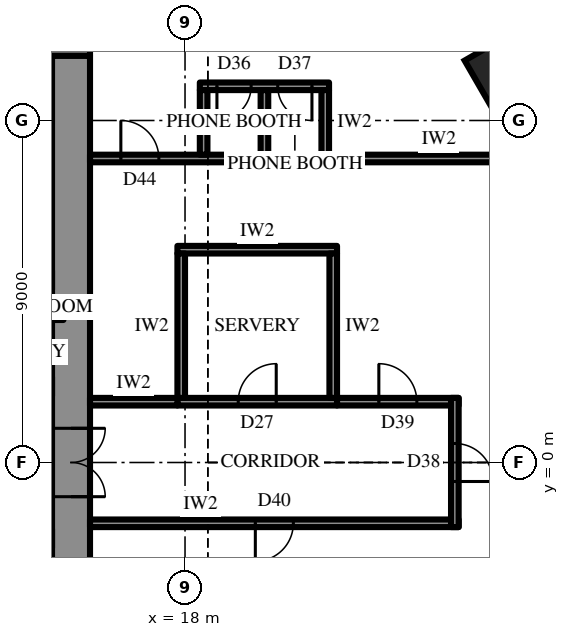
"""IFC4 building model, lengths in metres.
Left out: names, types, materials, properties, quantities, classifications, styles, units other than length and angle.
Written with IfcOpenShell. Run it as: python <this file> out.ifc"""

import sys

from ifc_helpers import new_model, si_unit, direction, frame, frame_2d, origin, origin_2d, place, context, subcontext, project, spatial, rectangle, hollow_rectangle, extrude, element, fill, save


model = new_model("IFC4")
c1 = context("Model", 3, precision=1e-05, world=origin(), true_north=direction((0.0, 1.0)))
c2 = subcontext(c1, "Body", "Model", "MODEL_VIEW")
j1 = project(units=[si_unit("LENGTHUNIT", "METRE"), si_unit("PLANEANGLEUNIT", "RADIAN")], contexts=[c1])
p1 = place(None, origin())
s1 = spatial("IfcSite", under=j1, at=p1, CompositionType="ELEMENT")
p2 = place(p1, origin())
s2 = spatial("IfcBuilding", under=s1, at=p2, CompositionType="ELEMENT")
p3 = place(p2, frame((0.0, 0.0, 215.5)))
s3 = spatial("IfcBuildingStorey", under=s2, at=p3, CompositionType="ELEMENT", Elevation=215.5)
p4 = place(p3, frame((26.861, 10.175, 0.0), z_axis=(0.0, 0.0, 1.0), x_axis=(-0.5, 0.866025403784, 0.0)))
e1 = element("IfcColumn", 1, at=p4, inside=s3, PredefinedType="COLUMN", context=c2, shape_type="SweptSolid", body=[
    extrude(hollow_rectangle(XDim=2.2, YDim=2.2, WallThickness=0.12, at=origin_2d()), origin(), (0.0, 0.0, 1.0), 4.2),
])
p5 = place(p3, frame((-15.5, 11.5, 0.0), z_axis=(0.0, 0.0, 1.0), x_axis=(1.0, 0.0, 0.0)))
e2 = element("IfcWall", 2, at=p5, inside=s3, PredefinedType="SHEAR", context=c2, shape_type="SweptSolid", body=[
    extrude(rectangle(XDim=31.0, YDim=1.6, at=frame_2d((15.5, 0.0))), origin(), (0.0, 0.0, 1.0), 4.2),
])
p6 = place(p5, frame((16.35, 0.0, 0.0)))
e3 = element("IfcOpeningElement", 3, at=p6, cuts=e2, PredefinedType="OPENING", context=c2, shape_type="SweptSolid", body=[
    extrude(rectangle(XDim=0.9, YDim=2.2, at=frame_2d((0.45, 1.1))), frame((0.0, 0.81, 0.0), z_axis=(0.0, -1.0, 0.0), x_axis=(1.0, 0.0, 0.0)), (0.0, 0.0, 1.0), 1.62),
])
p7 = place(p5, frame((19.35, 0.0, 0.0)))
e4 = element("IfcOpeningElement", 4, at=p7, cuts=e2, PredefinedType="OPENING", context=c2, shape_type="SweptSolid", body=[
    extrude(rectangle(XDim=0.9, YDim=2.2, at=frame_2d((0.45, 1.1))), frame((0.0, 0.81, 0.0), z_axis=(0.0, -1.0, 0.0), x_axis=(1.0, 0.0, 0.0)), (0.0, 0.0, 1.0), 1.62),
])
p8 = place(p5, frame((22.4, 0.0, 0.0)))
e5 = element("IfcOpeningElement", 5, at=p8, cuts=e2, PredefinedType="OPENING", context=c2, shape_type="SweptSolid", body=[
    extrude(rectangle(XDim=1.0, YDim=2.2, at=frame_2d((0.5, 1.1))), frame((0.0, 0.81, 0.0), z_axis=(0.0, -1.0, 0.0), x_axis=(1.0, 0.0, 0.0)), (0.0, 0.0, 1.0), 1.62),
])
p9 = place(p5, frame((1.65, 0.0, 0.0)))
e6 = element("IfcOpeningElement", 6, at=p9, cuts=e2, PredefinedType="OPENING", context=c2, shape_type="SweptSolid", body=[
    extrude(rectangle(XDim=0.9, YDim=2.2, at=frame_2d((0.45, 1.1))), frame((0.0, 0.81, 0.0), z_axis=(0.0, -1.0, 0.0), x_axis=(1.0, 0.0, 0.0)), (0.0, 0.0, 1.0), 1.62),
])
p10 = place(p5, frame((4.65, 0.0, 0.0)))
e7 = element("IfcOpeningElement", 7, at=p10, cuts=e2, PredefinedType="OPENING", context=c2, shape_type="SweptSolid", body=[
    extrude(rectangle(XDim=0.9, YDim=2.2, at=frame_2d((0.45, 1.1))), frame((0.0, 0.81, 0.0), z_axis=(0.0, -1.0, 0.0), x_axis=(1.0, 0.0, 0.0)), (0.0, 0.0, 1.0), 1.62),
])
p11 = place(p5, frame((25.45, 0.0, 0.0)))
e8 = element("IfcOpeningElement", 8, at=p11, cuts=e2, PredefinedType="OPENING", context=c2, shape_type="SweptSolid", body=[
    extrude(rectangle(XDim=0.9, YDim=2.2, at=frame_2d((0.45, 1.1))), frame((0.0, 0.81, 0.0), z_axis=(0.0, -1.0, 0.0), x_axis=(1.0, 0.0, 0.0)), (0.0, 0.0, 1.0), 1.62),
])
p12 = place(p5, frame((28.45, 0.0, 0.0)))
e9 = element("IfcOpeningElement", 9, at=p12, cuts=e2, PredefinedType="OPENING", context=c2, shape_type="SweptSolid", body=[
    extrude(rectangle(XDim=0.9, YDim=2.2, at=frame_2d((0.45, 1.1))), frame((0.0, 0.81, 0.0), z_axis=(0.0, -1.0, 0.0), x_axis=(1.0, 0.0, 0.0)), (0.0, 0.0, 1.0), 1.62),
])
p13 = place(p3, frame((15.0, -10.7, 0.0), z_axis=(0.0, 0.0, 1.0), x_axis=(0.0, 1.0, 0.0)))
e10 = element("IfcWall", 10, at=p13, inside=s3, PredefinedType="SHEAR", context=c2, shape_type="SweptSolid", body=[
    extrude(rectangle(XDim=21.4, YDim=1.0, at=frame_2d((10.7, 0.0))), origin(), (0.0, 0.0, 1.0), 4.2),
])
p14 = place(p13, frame((9.8, 0.0, 0.0)))
e11 = element("IfcOpeningElement", 11, at=p14, cuts=e10, PredefinedType="OPENING", context=c2, shape_type="SweptSolid", body=[
    extrude(rectangle(XDim=1.8, YDim=2.4, at=frame_2d((0.9, 1.2))), frame((0.0, 0.51, 0.0), z_axis=(0.0, -1.0, 0.0), x_axis=(1.0, 0.0, 0.0)), (0.0, 0.0, 1.0), 1.02),
])
p15 = place(p3, frame((12.3, 2.0, 0.0), z_axis=(0.0, 0.0, 1.0), x_axis=(1.0, 0.0, 0.0)))
e12 = element("IfcWall", 12, at=p15, inside=s3, PredefinedType="SHEAR", context=c2, shape_type="SweptSolid", body=[
    extrude(rectangle(XDim=2.2, YDim=0.5, at=frame_2d((1.1, 0.0))), origin(), (0.0, 0.0, 1.0), 4.2),
])
p16 = place(p15, frame((0.8, 0.0, 0.0)))
e13 = element("IfcOpeningElement", 13, at=p16, cuts=e12, PredefinedType="OPENING", context=c2, shape_type="SweptSolid", body=[
    extrude(rectangle(XDim=0.9, YDim=2.2, at=frame_2d((0.45, 1.1))), frame((0.0, 0.26, 0.0), z_axis=(0.0, -1.0, 0.0), x_axis=(1.0, 0.0, 0.0)), (0.0, 0.0, 1.0), 0.52),
])
p17 = place(p3, frame((12.3, 4.8, 0.0), z_axis=(0.0, 0.0, 1.0), x_axis=(1.0, 0.0, 0.0)))
e14 = element("IfcWall", 14, at=p17, inside=s3, PredefinedType="SHEAR", context=c2, shape_type="SweptSolid", body=[
    extrude(rectangle(XDim=2.2, YDim=0.5, at=frame_2d((1.1, 0.0))), origin(), (0.0, 0.0, 1.0), 4.2),
])
p18 = place(p3, frame((18.057, -26.425, 0.0), z_axis=(0.0, 0.0, 1.0), x_axis=(0.500001051461, 0.866024796723, 0.0)))
e15 = element("IfcWall", 15, at=p18, inside=s3, PredefinedType="SOLIDWALL", context=c2, shape_type="SweptSolid", body=[
    extrude(rectangle(XDim=27.713, YDim=0.3, at=frame_2d((13.856, 0.0))), origin(), (0.0, 0.0, 1.0), 2.0),
])
p19 = place(p18, frame((1.309, 0.0, 0.6)))
e16 = element("IfcOpeningElement", 16, at=p19, cuts=e15, PredefinedType="OPENING", context=c2, shape_type="SweptSolid", body=[
    extrude(rectangle(XDim=2.0, YDim=1.15, at=frame_2d((1.0, 0.575))), frame((0.0, 0.16, 0.0), z_axis=(0.0, -1.0, 0.0), x_axis=(1.0, 0.0, 0.0)), (0.0, 0.0, 1.0), 0.32),
])
p20 = place(p18, frame((5.928, 0.0, 0.6)))
e17 = element("IfcOpeningElement", 17, at=p20, cuts=e15, PredefinedType="OPENING", context=c2, shape_type="SweptSolid", body=[
    extrude(rectangle(XDim=2.0, YDim=1.15, at=frame_2d((1.0, 0.575))), frame((0.0, 0.16, 0.0), z_axis=(0.0, -1.0, 0.0), x_axis=(1.0, 0.0, 0.0)), (0.0, 0.0, 1.0), 0.32),
])
p21 = place(p18, frame((10.547, 0.0, 0.6)))
e18 = element("IfcOpeningElement", 18, at=p21, cuts=e15, PredefinedType="OPENING", context=c2, shape_type="SweptSolid", body=[
    extrude(rectangle(XDim=2.0, YDim=1.15, at=frame_2d((1.0, 0.575))), frame((0.0, 0.16, 0.0), z_axis=(0.0, -1.0, 0.0), x_axis=(1.0, 0.0, 0.0)), (0.0, 0.0, 1.0), 0.32),
])
p22 = place(p18, frame((15.166, 0.0, 0.6)))
e19 = element("IfcOpeningElement", 19, at=p22, cuts=e15, PredefinedType="OPENING", context=c2, shape_type="SweptSolid", body=[
    extrude(rectangle(XDim=2.0, YDim=1.15, at=frame_2d((1.0, 0.575))), frame((0.0, 0.16, 0.0), z_axis=(0.0, -1.0, 0.0), x_axis=(1.0, 0.0, 0.0)), (0.0, 0.0, 1.0), 0.32),
])
p23 = place(p18, frame((19.785, 0.0, 0.6)))
e20 = element("IfcOpeningElement", 20, at=p23, cuts=e15, PredefinedType="OPENING", context=c2, shape_type="SweptSolid", body=[
    extrude(rectangle(XDim=2.0, YDim=1.15, at=frame_2d((1.0, 0.575))), frame((0.0, 0.16, 0.0), z_axis=(0.0, -1.0, 0.0), x_axis=(1.0, 0.0, 0.0)), (0.0, 0.0, 1.0), 0.32),
])
p24 = place(p18, frame((24.403, 0.0, 0.6)))
e21 = element("IfcOpeningElement", 21, at=p24, cuts=e15, PredefinedType="OPENING", context=c2, shape_type="SweptSolid", body=[
    extrude(rectangle(XDim=2.0, YDim=1.15, at=frame_2d((1.0, 0.575))), frame((0.0, 0.16, 0.0), z_axis=(0.0, -1.0, 0.0), x_axis=(1.0, 0.0, 0.0)), (0.0, 0.0, 1.0), 0.32),
])
p25 = place(p3, frame((12.3, 3.85, 0.0), z_axis=(0.0, 0.0, 1.0), x_axis=(1.0, 0.0, 0.0)))
e22 = element("IfcWall", 22, at=p25, inside=s3, PredefinedType="PARTITIONING", context=c2, shape_type="SweptSolid", body=[
    extrude(rectangle(XDim=2.5, YDim=0.2, at=frame_2d((1.25, 0.0))), origin(), (0.0, 0.0, 1.0), 4.0),
])
p26 = place(p3, frame((17.8, 1.6, 0.0), z_axis=(0.0, 0.0, 1.0), x_axis=(1.0, 0.0, 0.0)))
e23 = element("IfcWall", 23, at=p26, inside=s3, PredefinedType="PARTITIONING", context=c2, shape_type="SweptSolid", body=[
    extrude(rectangle(XDim=4.2, YDim=0.2, at=frame_2d((2.1, 0.0))), origin(), (0.0, 0.0, 1.0), 4.0),
])
p27 = place(p26, frame((1.6, 0.0, 0.0)))
e24 = element("IfcOpeningElement", 24, at=p27, cuts=e23, PredefinedType="OPENING", context=c2, shape_type="SweptSolid", body=[
    extrude(rectangle(XDim=1.0, YDim=2.2, at=frame_2d((0.5, 1.1))), frame((0.0, 0.11, 0.0), z_axis=(0.0, -1.0, 0.0), x_axis=(1.0, 0.0, 0.0)), (0.0, 0.0, 1.0), 0.22),
])
p28 = place(p3, frame((17.8, 5.6, 0.0), z_axis=(0.0, 0.0, 1.0), x_axis=(1.0, 0.0, 0.0)))
e25 = element("IfcWall", 25, at=p28, inside=s3, PredefinedType="PARTITIONING", context=c2, shape_type="SweptSolid", body=[
    extrude(rectangle(XDim=4.2, YDim=0.2, at=frame_2d((2.1, 0.0))), origin(), (0.0, 0.0, 1.0), 4.0),
])
for number, where, z_axis, x_axis in (
    (26, (17.9, 1.7, 0.0), (0.0, 0.0, 1.0), (0.0, 1.0, 0.0)),
    (27, (21.9, 1.7, 0.0), (0.0, 0.0, 1.0), (0.0, 1.0, 0.0)),
):
    element("IfcWall", number, at=place(p3, frame(where, z_axis=z_axis, x_axis=x_axis)), inside=s3, PredefinedType="PARTITIONING", context=c2, shape_type="SweptSolid", body=[
        extrude(rectangle(XDim=3.8, YDim=0.2, at=frame_2d((1.9, 0.0))), origin(), (0.0, 0.0, 1.0), 4.0),
    ])
p29 = place(p3, frame((15.5, 1.6, 0.0), z_axis=(0.0, 0.0, 1.0), x_axis=(1.0, 0.0, 0.0)))
e28 = element("IfcWall", 28, at=p29, inside=s3, PredefinedType="PARTITIONING", context=c2, shape_type="SweptSolid", body=[
    extrude(rectangle(XDim=2.3, YDim=0.2, at=frame_2d((1.15, 0.0))), origin(), (0.0, 0.0, 1.0), 4.0),
])
p30 = place(p3, frame((22.0, 1.6, 0.0), z_axis=(0.0, 0.0, 1.0), x_axis=(1.0, 0.0, 0.0)))
e29 = element("IfcWall", 29, at=p30, inside=s3, PredefinedType="PARTITIONING", context=c2, shape_type="SweptSolid", body=[
    extrude(rectangle(XDim=3.2, YDim=0.2, at=frame_2d((1.6, 0.0))), origin(), (0.0, 0.0, 1.0), 4.0),
])
p31 = place(p30, frame((1.1, 0.0, 0.0)))
e30 = element("IfcOpeningElement", 30, at=p31, cuts=e29, PredefinedType="OPENING", context=c2, shape_type="SweptSolid", body=[
    extrude(rectangle(XDim=1.0, YDim=2.2, at=frame_2d((0.5, 1.1))), frame((0.0, 0.11, 0.0), z_axis=(0.0, -1.0, 0.0), x_axis=(1.0, 0.0, 0.0)), (0.0, 0.0, 1.0), 0.22),
])
p32 = place(p3, frame((15.5, -1.6, 0.0), z_axis=(0.0, 0.0, 1.0), x_axis=(1.0, 0.0, 0.0)))
e31 = element("IfcWall", 31, at=p32, inside=s3, PredefinedType="PARTITIONING", context=c2, shape_type="SweptSolid", body=[
    extrude(rectangle(XDim=9.7, YDim=0.2, at=frame_2d((4.85, 0.0))), origin(), (0.0, 0.0, 1.0), 4.0),
])
p33 = place(p32, frame((4.35, 0.0, 0.0)))
e32 = element("IfcOpeningElement", 32, at=p33, cuts=e31, PredefinedType="OPENING", context=c2, shape_type="SweptSolid", body=[
    extrude(rectangle(XDim=1.0, YDim=2.2, at=frame_2d((0.5, 1.1))), frame((0.0, 0.11, 0.0), z_axis=(0.0, -1.0, 0.0), x_axis=(1.0, 0.0, 0.0)), (0.0, 0.0, 1.0), 0.22),
])
p34 = place(p3, frame((25.1, -1.7, 0.0), z_axis=(0.0, 0.0, 1.0), x_axis=(0.0, 1.0, 0.0)))
e33 = element("IfcWall", 33, at=p34, inside=s3, PredefinedType="PARTITIONING", context=c2, shape_type="SweptSolid", body=[
    extrude(rectangle(XDim=3.4, YDim=0.2, at=frame_2d((1.7, 0.0))), origin(), (0.0, 0.0, 1.0), 4.0),
])
p35 = place(p34, frame((1.2, 0.0, 0.0)))
e34 = element("IfcOpeningElement", 34, at=p35, cuts=e33, PredefinedType="OPENING", context=c2, shape_type="SweptSolid", body=[
    extrude(rectangle(XDim=1.0, YDim=2.2, at=frame_2d((0.5, 1.1))), frame((0.0, 0.11, 0.0), z_axis=(0.0, -1.0, 0.0), x_axis=(1.0, 0.0, 0.0)), (0.0, 0.0, 1.0), 0.22),
])
p36 = place(p3, frame((15.5, 8.0, 0.0), z_axis=(0.0, 0.0, 1.0), x_axis=(1.0, 0.0, 0.0)))
e35 = element("IfcWall", 35, at=p36, inside=s3, PredefinedType="PARTITIONING", context=c2, shape_type="SweptSolid", body=[
    extrude(rectangle(XDim=13.113, YDim=0.2, at=frame_2d((6.557, 0.0))), origin(), (0.0, 0.0, 1.0), 4.0),
])
p37 = place(p36, frame((0.811, 0.0, 0.0)))
e36 = element("IfcOpeningElement", 36, at=p37, cuts=e35, PredefinedType="OPENING", context=c2, shape_type="SweptSolid", body=[
    extrude(rectangle(XDim=1.0, YDim=2.2, at=frame_2d((0.5, 1.1))), frame((0.0, 0.11, 0.0), z_axis=(0.0, -1.0, 0.0), x_axis=(1.0, 0.0, 0.0)), (0.0, 0.0, 1.0), 0.22),
])
p38 = place(p3, frame((18.39, 9.9, 0.0), z_axis=(0.0, 0.0, 1.0), x_axis=(1.0, 0.0, 0.0)))
e37 = element("IfcWall", 37, at=p38, inside=s3, PredefinedType="PARTITIONING", context=c2, shape_type="SweptSolid", body=[
    extrude(rectangle(XDim=3.4, YDim=0.2, at=frame_2d((1.7, 0.0))), origin(), (0.0, 0.0, 1.0), 4.0),
])
p39 = place(p38, frame((0.45, 0.0, 0.0)))
e38 = element("IfcOpeningElement", 38, at=p39, cuts=e37, PredefinedType="OPENING", context=c2, shape_type="SweptSolid", body=[
    extrude(rectangle(XDim=0.9, YDim=2.2, at=frame_2d((0.45, 1.1))), frame((0.0, 0.11, 0.0), z_axis=(0.0, -1.0, 0.0), x_axis=(1.0, 0.0, 0.0)), (0.0, 0.0, 1.0), 0.22),
])
p40 = place(p38, frame((2.05, 0.0, 0.0)))
e39 = element("IfcOpeningElement", 39, at=p40, cuts=e37, PredefinedType="OPENING", context=c2, shape_type="SweptSolid", body=[
    extrude(rectangle(XDim=0.9, YDim=2.2, at=frame_2d((0.45, 1.1))), frame((0.0, 0.11, 0.0), z_axis=(0.0, -1.0, 0.0), x_axis=(1.0, 0.0, 0.0)), (0.0, 0.0, 1.0), 0.22),
])
for number, where, z_axis, x_axis in (
    (40, (18.49, 8.1, 0.0), (0.0, 0.0, 1.0), (0.0, 1.0, 0.0)),
    (41, (20.09, 8.1, 0.0), (0.0, 0.0, 1.0), (0.0, 1.0, 0.0)),
    (42, (21.69, 8.1, 0.0), (0.0, 0.0, 1.0), (0.0, 1.0, 0.0)),
):
    element("IfcWall", number, at=place(p3, frame(where, z_axis=z_axis, x_axis=x_axis)), inside=s3, PredefinedType="PARTITIONING", context=c2, shape_type="SweptSolid", body=[
        extrude(rectangle(XDim=1.7, YDim=0.2, at=frame_2d((0.85, 0.0))), origin(), (0.0, 0.0, 1.0), 4.0),
    ])
p41 = place(p14, frame((1.8, 0.0, 0.0), z_axis=(0.0, 0.0, 1.0), x_axis=(-1.0, 0.0, 0.0)))
e43 = element("IfcDoor", 43, at=p41, inside=s3, OperationType="DOUBLE_DOOR_SINGLE_SWING", PredefinedType="DOOR", context=c2, shape_type="SweptSolid", body=[
    extrude(rectangle(XDim=1.8, YDim=2.4, at=frame_2d((0.9, 1.2))), frame((0.0, 0.025, 0.0), z_axis=(0.0, -1.0, 0.0), x_axis=(1.0, 0.0, 0.0)), (0.0, 0.0, 1.0), 0.05),
])
fill(e11, e43)
p42 = place(p27, origin())
e44 = element("IfcDoor", 44, at=p42, inside=s3, OperationType="SINGLE_SWING_LEFT", PredefinedType="DOOR", context=c2, shape_type="SweptSolid", body=[
    extrude(rectangle(XDim=1.0, YDim=2.2, at=frame_2d((0.5, 1.1))), frame((0.0, 0.025, 0.0), z_axis=(0.0, -1.0, 0.0), x_axis=(1.0, 0.0, 0.0)), (0.0, 0.0, 1.0), 0.05),
])
fill(e24, e44)
p43 = place(p31, origin())
e45 = element("IfcDoor", 45, at=p43, inside=s3, OperationType="SINGLE_SWING_RIGHT", PredefinedType="DOOR", context=c2, shape_type="SweptSolid", body=[
    extrude(rectangle(XDim=1.0, YDim=2.2, at=frame_2d((0.5, 1.1))), frame((0.0, 0.025, 0.0), z_axis=(0.0, -1.0, 0.0), x_axis=(1.0, 0.0, 0.0)), (0.0, 0.0, 1.0), 0.05),
])
fill(e30, e45)
p44 = place(p33, frame((1.0, 0.0, 0.0), z_axis=(0.0, 0.0, 1.0), x_axis=(-1.0, 0.0, 0.0)))
e46 = element("IfcDoor", 46, at=p44, inside=s3, OperationType="SINGLE_SWING_LEFT", PredefinedType="DOOR", context=c2, shape_type="SweptSolid", body=[
    extrude(rectangle(XDim=1.0, YDim=2.2, at=frame_2d((0.5, 1.1))), frame((0.0, 0.025, 0.0), z_axis=(0.0, -1.0, 0.0), x_axis=(1.0, 0.0, 0.0)), (0.0, 0.0, 1.0), 0.05),
])
fill(e32, e46)
p45 = place(p35, frame((1.0, 0.0, 0.0), z_axis=(0.0, 0.0, 1.0), x_axis=(-1.0, 0.0, 0.0)))
e47 = element("IfcDoor", 47, at=p45, inside=s3, OperationType="SINGLE_SWING_LEFT", PredefinedType="DOOR", context=c2, shape_type="SweptSolid", body=[
    extrude(rectangle(XDim=1.0, YDim=2.2, at=frame_2d((0.5, 1.1))), frame((0.0, 0.025, 0.0), z_axis=(0.0, -1.0, 0.0), x_axis=(1.0, 0.0, 0.0)), (0.0, 0.0, 1.0), 0.05),
])
fill(e34, e47)
p46 = place(p37, origin())
e48 = element("IfcDoor", 48, at=p46, inside=s3, OperationType="SINGLE_SWING_RIGHT", PredefinedType="DOOR", context=c2, shape_type="SweptSolid", body=[
    extrude(rectangle(XDim=1.0, YDim=2.2, at=frame_2d((0.5, 1.1))), frame((0.0, 0.025, 0.0), z_axis=(0.0, -1.0, 0.0), x_axis=(1.0, 0.0, 0.0)), (0.0, 0.0, 1.0), 0.05),
])
fill(e36, e48)
p47 = place(p39, frame((0.9, 0.0, 0.0), z_axis=(0.0, 0.0, 1.0), x_axis=(-1.0, 0.0, 0.0)))
e49 = element("IfcDoor", 49, at=p47, inside=s3, OperationType="SINGLE_SWING_LEFT", PredefinedType="DOOR", context=c2, shape_type="SweptSolid", body=[
    extrude(rectangle(XDim=0.9, YDim=2.2, at=frame_2d((0.45, 1.1))), frame((0.0, 0.025, 0.0), z_axis=(0.0, -1.0, 0.0), x_axis=(1.0, 0.0, 0.0)), (0.0, 0.0, 1.0), 0.05),
])
fill(e38, e49)
p48 = place(p40, frame((0.9, 0.0, 0.0), z_axis=(0.0, 0.0, 1.0), x_axis=(-1.0, 0.0, 0.0)))
e50 = element("IfcDoor", 50, at=p48, inside=s3, OperationType="SINGLE_SWING_RIGHT", PredefinedType="DOOR", context=c2, shape_type="SweptSolid", body=[
    extrude(rectangle(XDim=0.9, YDim=2.2, at=frame_2d((0.45, 1.1))), frame((0.0, 0.025, 0.0), z_axis=(0.0, -1.0, 0.0), x_axis=(1.0, 0.0, 0.0)), (0.0, 0.0, 1.0), 0.05),
])
fill(e39, e50)
save(model, sys.argv[1])
